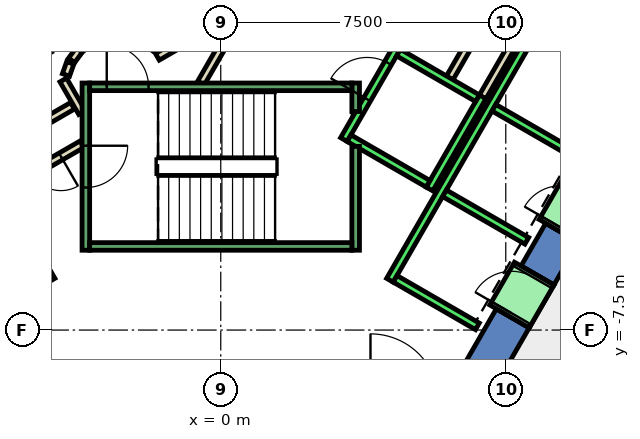
"""IFC4 building model, lengths in metres.
Left out: names, types, materials, properties, quantities, classifications, styles, units other than length and angle.
Written with IfcOpenShell. Run it as: python <this file> out.ifc"""

import sys

from ifc_helpers import new_model, si_unit, direction, frame, frame_2d, origin, place, context, subcontext, project, spatial, polyline, rectangle, outline, extrude, element, fill, save


model = new_model("IFC4")
c1 = context("Model", 3, precision=1e-05, world=origin(), true_north=direction((0.0, 1.0)))
c2 = subcontext(c1, "Body", "Model", "MODEL_VIEW")
j1 = project(units=[si_unit("LENGTHUNIT", "METRE"), si_unit("PLANEANGLEUNIT", "RADIAN")], contexts=[c1])
p1 = place(None, origin())
s1 = spatial("IfcSite", under=j1, at=p1, CompositionType="ELEMENT")
p2 = place(p1, origin())
s2 = spatial("IfcBuilding", under=s1, at=p2, CompositionType="ELEMENT")
p3 = place(p2, frame((0.0, 0.0, 60.2)))
s3 = spatial("IfcBuildingStorey", under=s2, at=p3, CompositionType="ELEMENT", Elevation=60.2)
p4 = place(p3, frame((0.0, 0.0, -0.4)))
e1 = element("IfcWall", 1, at=p4, inside=s3, PredefinedType="SHEAR", context=c2, shape_type="SweptSolid", body=[
    extrude(outline(polyline([(8.117, -7.44), (7.252, -6.94), (6.351, -8.5), (6.928, -9.5), (8.117, -7.44)])), origin(), (0.0, 0.0, 1.0), 4.2),
])
p5 = place(p3, frame((0.0, 0.0, -0.4)))
e2 = element("IfcWall", 2, at=p5, inside=s3, PredefinedType="SHEAR", context=c2, shape_type="SweptSolid", body=[
    extrude(outline(polyline([(9.417, -5.189), (8.551, -4.689), (7.902, -5.814), (8.767, -6.314), (9.417, -5.189)])), origin(), (0.0, 0.0, 1.0), 4.2),
])
p6 = place(p3, frame((0.0, 0.0, 3.6)))
e3 = element("IfcWall", 3, at=p6, inside=s3, PredefinedType="SHEAR", context=c2, shape_type="SweptSolid", body=[
    extrude(outline(polyline([(8.767, -6.314), (7.902, -5.814), (7.252, -6.94), (8.117, -7.44), (8.767, -6.314)])), origin(), (0.0, 0.0, 1.0), 0.2),
])
p7 = place(p3, frame((0.0, 0.0, 3.6)))
e4 = element("IfcWall", 4, at=p7, inside=s3, PredefinedType="SHEAR", context=c2, shape_type="SweptSolid", body=[
    extrude(outline(polyline([(10.067, -4.063), (9.201, -3.563), (8.551, -4.689), (9.417, -5.189), (10.067, -4.063)])), origin(), (0.0, 0.0, 1.0), 0.2),
])
p8 = place(p3, frame((6.826, 0.522, 0.0), z_axis=(0.0, 0.0, 1.0), x_axis=(-0.500016722714, -0.866015748706, 0.0)))
e5 = element("IfcWall", 5, at=p8, inside=s3, PredefinedType="PARTITIONING", context=c2, shape_type="SweptSolid", body=[
    extrude(rectangle(XDim=1.7, YDim=0.2, at=frame_2d((0.85, 0.0))), origin(), (0.0, 0.0, 1.0), 3.8),
])
p9 = place(p3, frame((8.192, 0.888, 0.0), z_axis=(0.0, 0.0, 1.0), x_axis=(-0.499940625693, -0.866059680843, 0.0)))
e6 = element("IfcWall", 6, at=p9, inside=s3, PredefinedType="PARTITIONING", context=c2, shape_type="SweptSolid", body=[
    extrude(rectangle(XDim=2.68, YDim=0.2, at=frame_2d((1.34, 0.0))), origin(), (0.0, 0.0, 1.0), 3.8),
])
p10 = place(p3, frame((-3.9, -1.599, 0.0), z_axis=(0.0, 0.0, 1.0), x_axis=(-0.865969445389, -0.500096910261, 0.0)))
e7 = element("IfcWall", 7, at=p10, inside=s3, PredefinedType="PARTITIONING", context=c2, shape_type="SweptSolid", body=[
    extrude(rectangle(XDim=1.373, YDim=0.2, at=frame_2d((0.687, 0.0))), origin(), (0.0, 0.0, 1.0), 3.8),
])
p11 = place(p3, frame((-3.65, -2.61, 0.0), z_axis=(0.0, 0.0, 1.0), x_axis=(-0.866072462134, -0.499918483688, 0.0)))
e8 = element("IfcWall", 8, at=p11, inside=s3, PredefinedType="PARTITIONING", context=c2, shape_type="SweptSolid", body=[
    extrude(rectangle(XDim=2.084, YDim=0.2, at=frame_2d((1.042, 0.0))), origin(), (0.0, 0.0, 1.0), 3.8),
])
p12 = place(p11, frame((0.642, 0.0, 0.0)))
e9 = element("IfcOpeningElement", 9, at=p12, cuts=e8, PredefinedType="OPENING", context=c2, shape_type="SweptSolid", body=[
    extrude(rectangle(XDim=0.9, YDim=2.1, at=frame_2d((0.45, 1.05))), frame((0.0, 0.11, 0.0), z_axis=(0.0, -1.0, 0.0), x_axis=(1.0, 0.0, 0.0)), (0.0, 0.0, 1.0), 0.22),
])
p13 = place(p3, frame((-4.145, -0.92, 0.0), z_axis=(0.0, 0.0, 1.0), x_axis=(0.499743786207, -0.866173278362, 0.0)))
e10 = element("IfcWall", 10, at=p13, inside=s3, PredefinedType="PARTITIONING", context=c2, shape_type="SweptSolid", body=[
    extrude(rectangle(XDim=0.991, YDim=0.2, at=frame_2d((0.495, 0.0))), origin(), (0.0, 0.0, 1.0), 3.8),
])
p14 = place(p3, frame((-0.52, -1.0, 0.0), z_axis=(0.0, 0.0, 1.0), x_axis=(0.50011622646, 0.865958290007, 0.0)))
e11 = element("IfcWall", 11, at=p14, inside=s3, PredefinedType="PARTITIONING", context=c2, shape_type="SweptSolid", body=[
    extrude(rectangle(XDim=4.991, YDim=0.2, at=frame_2d((2.496, 0.0))), origin(), (0.0, 0.0, 1.0), 3.8),
])
p15 = place(p14, frame((1.945, 0.0, 0.0)))
e12 = element("IfcOpeningElement", 12, at=p15, cuts=e11, PredefinedType="OPENING", context=c2, shape_type="SweptSolid", body=[
    extrude(rectangle(XDim=1.0, YDim=2.1, at=frame_2d((0.5, 1.05))), frame((0.0, 0.11, 0.0), z_axis=(0.0, -1.0, 0.0), x_axis=(1.0, 0.0, 0.0)), (0.0, 0.0, 1.0), 0.22),
])
p16 = place(p3, frame((-0.412, 0.414, 0.0), z_axis=(0.0, 0.0, 1.0), x_axis=(-0.866017369001, -0.500013916395, 0.0)))
e13 = element("IfcWall", 13, at=p16, inside=s3, PredefinedType="PARTITIONING", context=c2, shape_type="SweptSolid", body=[
    extrude(rectangle(XDim=1.45, YDim=0.2, at=frame_2d((0.725, 0.0))), origin(), (0.0, 0.0, 1.0), 3.8),
])
p17 = place(p3, frame((-3.723, -0.131, 0.0), z_axis=(0.0, 0.0, 1.0), x_axis=(-0.594675113454, -0.803966112121, 0.0)))
e14 = element("IfcWall", 14, at=p17, inside=s3, PredefinedType="PARTITIONING", context=c2, shape_type="SweptSolid", body=[
    extrude(rectangle(XDim=0.338, YDim=0.2, at=frame_2d((0.169, 0.0))), origin(), (0.0, 0.0, 1.0), 3.8),
])
p18 = place(p3, frame((-3.96, -0.47, 0.0), z_axis=(0.0, 0.0, 1.0), x_axis=(-0.334824194261, -0.942280615813, 0.0)))
e15 = element("IfcWall", 15, at=p18, inside=s3, PredefinedType="PARTITIONING", context=c2, shape_type="SweptSolid", body=[
    extrude(rectangle(XDim=0.338, YDim=0.2, at=frame_2d((0.169, 0.0))), origin(), (0.0, 0.0, 1.0), 3.8),
])
p19 = place(p3, frame((12.401, -7.622, 0.0), z_axis=(0.0, 0.0, 1.0), x_axis=(-0.500029185841, -0.866008552675, 0.0)))
e16 = element("IfcWall", 16, at=p19, inside=s3, PredefinedType="PARTITIONING", context=c2, shape_type="SweptSolid", body=[
    extrude(rectangle(XDim=9.301, YDim=0.2, at=frame_2d((4.651, 0.0))), origin(), (0.0, 0.0, 1.0), 3.8),
])
p20 = place(p3, frame((-9.751, 2.99, 0.0), z_axis=(0.0, 0.0, 1.0), x_axis=(0.50000090737, -0.866024879913, 0.0)))
e17 = element("IfcWall", 17, at=p20, inside=s3, PredefinedType="STANDARD", context=c2, shape_type="SweptSolid", body=[
    extrude(rectangle(XDim=10.6, YDim=0.2, at=frame_2d((5.3, 0.0))), origin(), (0.0, 0.0, 1.0), 3.8),
])
p21 = place(p3, frame((3.24, -2.488, 0.0), z_axis=(0.0, 0.0, 1.0), x_axis=(0.49994636267, 0.866056369097, 0.0)))
e18 = element("IfcWall", 18, at=p21, inside=s3, PredefinedType="STANDARD", context=c2, shape_type="SweptSolid", body=[
    extrude(rectangle(XDim=2.8, YDim=0.2, at=frame_2d((1.4, 0.0))), origin(), (0.0, 0.0, 1.0), 3.8),
])
p22 = place(p21, frame((1.225, 0.0, 0.0)))
e19 = element("IfcOpeningElement", 19, at=p22, cuts=e18, PredefinedType="OPENING", context=c2, shape_type="SweptSolid", body=[
    extrude(rectangle(XDim=1.1, YDim=2.1, at=frame_2d((0.55, 1.05))), frame((0.0, 0.11, 0.0), z_axis=(0.0, -1.0, 0.0), x_axis=(1.0, 0.0, 0.0)), (0.0, 0.0, 1.0), 0.22),
])
p23 = place(p3, frame((5.492, -3.788, 0.0), z_axis=(0.0, 0.0, 1.0), x_axis=(0.500011755427, 0.866018616679, 0.0)))
e20 = element("IfcWall", 20, at=p23, inside=s3, PredefinedType="STANDARD", context=c2, shape_type="SweptSolid", body=[
    extrude(rectangle(XDim=2.8, YDim=0.2, at=frame_2d((1.4, 0.0))), origin(), (0.0, 0.0, 1.0), 3.8),
])
p24 = place(p3, frame((3.377, -2.452, 0.0), z_axis=(0.0, 0.0, 1.0), x_axis=(0.865955154139, -0.50012165622, 0.0)))
e21 = element("IfcWall", 21, at=p24, inside=s3, PredefinedType="STANDARD", context=c2, shape_type="SweptSolid", body=[
    extrude(rectangle(XDim=2.4, YDim=0.2, at=frame_2d((1.2, 0.0))), origin(), (0.0, 0.0, 1.0), 3.8),
])
p25 = place(p3, frame((4.677, -0.2, 0.0), z_axis=(0.0, 0.0, 1.0), x_axis=(0.865973769406, -0.500089422704, 0.0)))
e22 = element("IfcWall", 22, at=p25, inside=s3, PredefinedType="STANDARD", context=c2, shape_type="SweptSolid", body=[
    extrude(rectangle(XDim=2.399, YDim=0.2, at=frame_2d((1.2, 0.0))), origin(), (0.0, 0.0, 1.0), 3.8),
])
p26 = place(p3, frame((4.451, -6.19, 0.0), z_axis=(0.0, 0.0, 1.0), x_axis=(0.50000090737, 0.866024879913, 0.0)))
e23 = element("IfcWall", 23, at=p26, inside=s3, PredefinedType="STANDARD", context=c2, shape_type="SweptSolid", body=[
    extrude(rectangle(XDim=10.6, YDim=0.2, at=frame_2d((5.3, 0.0))), origin(), (0.0, 0.0, 1.0), 3.8),
])
for number, where, z_axis, x_axis in (
    (24, (4.588, -6.153, 0.0), (0.0, 0.0, 1.0), (0.866, -0.5, 0.0)),
    (25, (5.888, -3.902, 0.0), (0.0, 0.0, 1.0), (0.866, -0.5, 0.0)),
    (26, (7.188, -1.65, 0.0), (0.0, 0.0, 1.0), (0.866, -0.5, 0.0)),
    (27, (8.488, 0.602, 0.0), (0.0, 0.0, 1.0), (0.866, -0.5, 0.0)),
):
    element("IfcWall", number, at=place(p3, frame(where, z_axis=z_axis, x_axis=x_axis)), inside=s3, PredefinedType="STANDARD", context=c2, shape_type="SweptSolid", body=[
        extrude(rectangle(XDim=2.5, YDim=0.2, at=frame_2d((1.25, 0.0))), origin(), (0.0, 0.0, 1.0), 3.8),
    ])
p27 = place(p3, frame((7.598, -7.14, 0.0), z_axis=(0.0, 0.0, 1.0), x_axis=(0.500362116554, 0.865816234728, 0.0)))
e28 = element("IfcWall", 28, at=p27, inside=s3, PredefinedType="STANDARD", context=c2, shape_type="SweptSolid", body=[
    extrude(rectangle(XDim=1.299, YDim=1.2, at=frame_2d((0.65, 0.0))), origin(), (0.0, 0.0, 1.0), 2.4),
])
p28 = place(p27, frame((0.1, 0.0, 0.0)))
e29 = element("IfcOpeningElement", 29, at=p28, cuts=e28, PredefinedType="OPENING", context=c2, shape_type="SweptSolid", body=[
    extrude(rectangle(XDim=1.1, YDim=2.3, at=frame_2d((0.55, 1.15))), frame((0.0, 0.61, 0.0), z_axis=(0.0, -1.0, 0.0), x_axis=(1.0, 0.0, 0.0)), (0.0, 0.0, 1.0), 1.22),
])
p29 = place(p3, frame((8.898, -4.889, 0.0), z_axis=(0.0, 0.0, 1.0), x_axis=(0.500036693733, 0.866004217611, 0.0)))
e30 = element("IfcWall", 30, at=p29, inside=s3, PredefinedType="STANDARD", context=c2, shape_type="SweptSolid", body=[
    extrude(rectangle(XDim=1.3, YDim=1.2, at=frame_2d((0.65, 0.0))), origin(), (0.0, 0.0, 1.0), 2.4),
])
p30 = place(p29, frame((0.1, 0.0, 0.0)))
e31 = element("IfcOpeningElement", 31, at=p30, cuts=e30, PredefinedType="OPENING", context=c2, shape_type="SweptSolid", body=[
    extrude(rectangle(XDim=1.1, YDim=2.3, at=frame_2d((0.55, 1.15))), frame((0.0, 0.61, 0.0), z_axis=(0.0, -1.0, 0.0), x_axis=(1.0, 0.0, 0.0)), (0.0, 0.0, 1.0), 1.22),
])
p31 = place(p3, frame((-3.55, -1.0, 0.0), z_axis=(0.0, 0.0, 1.0), x_axis=(0.0, -1.0, 0.0)))
e32 = element("IfcWall", 32, at=p31, inside=s3, PredefinedType="STANDARD", context=c2, shape_type="SweptSolid", body=[
    extrude(rectangle(XDim=4.4, YDim=0.2, at=frame_2d((2.2, 0.0))), origin(), (0.0, 0.0, 1.0), 3.8),
])
p32 = place(p31, frame((1.65, 0.0, 0.0)))
e33 = element("IfcOpeningElement", 33, at=p32, cuts=e32, PredefinedType="OPENING", context=c2, shape_type="SweptSolid", body=[
    extrude(rectangle(XDim=1.1, YDim=2.2, at=frame_2d((0.55, 1.1))), frame((0.0, 0.11, 0.0), z_axis=(0.0, -1.0, 0.0), x_axis=(1.0, 0.0, 0.0)), (0.0, 0.0, 1.0), 0.22),
])
p33 = place(p3, frame((3.55, -2.667, 0.0), z_axis=(0.0, 0.0, 1.0), x_axis=(0.0, -1.0, 0.0)))
e34 = element("IfcWall", 34, at=p33, inside=s3, PredefinedType="STANDARD", context=c2, shape_type="SweptSolid", body=[
    extrude(rectangle(XDim=2.733, YDim=0.2, at=frame_2d((1.366, 0.0))), origin(), (0.0, 0.0, 1.0), 3.8),
])
p34 = place(p3, frame((3.55, -1.0, 0.0), z_axis=(0.0, 0.0, 1.0), x_axis=(0.0, -1.0, 0.0)))
e35 = element("IfcWall", 35, at=p34, inside=s3, PredefinedType="STANDARD", context=c2, shape_type="SweptSolid", body=[
    extrude(rectangle(XDim=0.751, YDim=0.2, at=frame_2d((0.375, 0.0))), origin(), (0.0, 0.0, 1.0), 3.8),
])
p35 = place(p3, frame((-3.45, -1.1, 0.0), z_axis=(0.0, 0.0, 1.0), x_axis=(1.0, 0.0, 0.0)))
e36 = element("IfcWall", 36, at=p35, inside=s3, PredefinedType="STANDARD", context=c2, shape_type="SweptSolid", body=[
    extrude(rectangle(XDim=6.9, YDim=0.2, at=frame_2d((3.45, 0.0))), origin(), (0.0, 0.0, 1.0), 3.8),
])
p36 = place(p35, frame((0.45, 0.0, 0.0)))
e37 = element("IfcOpeningElement", 37, at=p36, cuts=e36, PredefinedType="OPENING", context=c2, shape_type="SweptSolid", body=[
    extrude(rectangle(XDim=1.1, YDim=2.2, at=frame_2d((0.55, 1.1))), frame((0.0, 0.11, 0.0), z_axis=(0.0, -1.0, 0.0), x_axis=(1.0, 0.0, 0.0)), (0.0, 0.0, 1.0), 0.22),
])
p37 = place(p3, frame((-3.45, -5.3, 0.0), z_axis=(0.0, 0.0, 1.0), x_axis=(1.0, 0.0, 0.0)))
e38 = element("IfcWall", 38, at=p37, inside=s3, PredefinedType="STANDARD", context=c2, shape_type="SweptSolid", body=[
    extrude(rectangle(XDim=6.9, YDim=0.2, at=frame_2d((3.45, 0.0))), origin(), (0.0, 0.0, 1.0), 3.8),
])
p38 = place(p12, origin())
e39 = element("IfcDoor", 39, at=p38, inside=s3, OperationType="SINGLE_SWING_LEFT", PredefinedType="DOOR", context=c2, shape_type="SweptSolid", body=[
    extrude(rectangle(XDim=0.9, YDim=2.1, at=frame_2d((0.45, 1.05))), frame((0.0, 0.025, 0.0), z_axis=(0.0, -1.0, 0.0), x_axis=(1.0, 0.0, 0.0)), (0.0, 0.0, 1.0), 0.05),
])
fill(e9, e39)
p39 = place(p28, origin())
e40 = element("IfcDoor", 40, at=p39, inside=s3, OperationType="SLIDING_TO_LEFT", PredefinedType="DOOR", context=c2, shape_type="SweptSolid", body=[
    extrude(rectangle(XDim=1.1, YDim=2.3, at=frame_2d((0.55, 1.15))), frame((0.0, 0.025, 0.0), z_axis=(0.0, -1.0, 0.0), x_axis=(1.0, 0.0, 0.0)), (0.0, 0.0, 1.0), 0.05),
])
fill(e29, e40)
p40 = place(p22, origin())
e41 = element("IfcDoor", 41, at=p40, inside=s3, OperationType="SLIDING_TO_LEFT", PredefinedType="DOOR", context=c2, shape_type="SweptSolid", body=[
    extrude(rectangle(XDim=1.1, YDim=2.1, at=frame_2d((0.55, 1.05))), frame((0.0, 0.025, 0.0), z_axis=(0.0, -1.0, 0.0), x_axis=(1.0, 0.0, 0.0)), (0.0, 0.0, 1.0), 0.05),
])
fill(e19, e41)
p41 = place(p36, origin())
e42 = element("IfcDoor", 42, at=p41, inside=s3, OperationType="SINGLE_SWING_LEFT", PredefinedType="DOOR", context=c2, shape_type="SweptSolid", body=[
    extrude(rectangle(XDim=1.1, YDim=2.2, at=frame_2d((0.55, 1.1))), frame((0.0, 0.025, 0.0), z_axis=(0.0, -1.0, 0.0), x_axis=(1.0, 0.0, 0.0)), (0.0, 0.0, 1.0), 0.05),
])
fill(e37, e42)
p42 = place(p32, origin())
e43 = element("IfcDoor", 43, at=p42, inside=s3, OperationType="SINGLE_SWING_LEFT", PredefinedType="DOOR", context=c2, shape_type="SweptSolid", body=[
    extrude(rectangle(XDim=1.1, YDim=2.2, at=frame_2d((0.55, 1.1))), frame((0.0, 0.025, 0.0), z_axis=(0.0, -1.0, 0.0), x_axis=(1.0, 0.0, 0.0)), (0.0, 0.0, 1.0), 0.05),
])
fill(e33, e43)
save(model, sys.argv[1])
